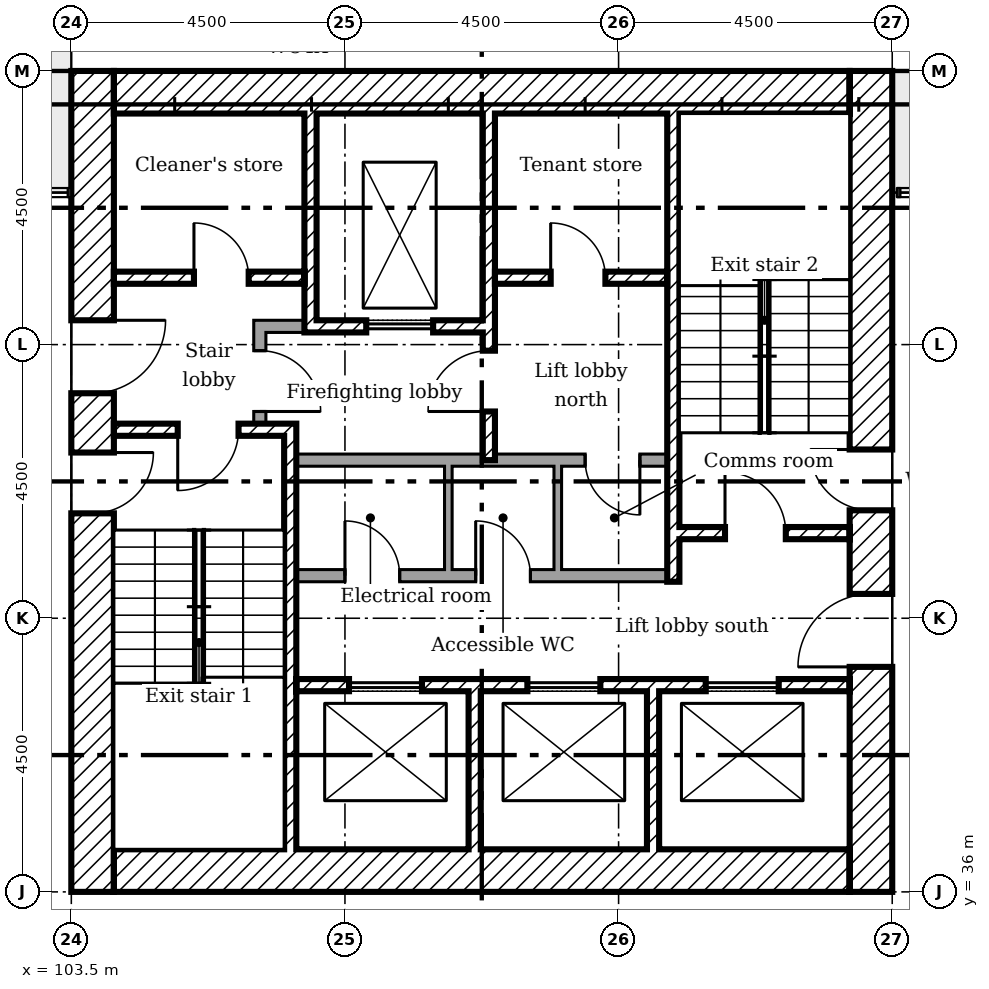
"""IFC4 building model, lengths in metres.
Left out: names, types, materials, properties, quantities, classifications, styles, units other than length and angle.
Written with IfcOpenShell. Run it as: python <this file> out.ifc"""

import sys

from ifc_helpers import new_model, si_unit, direction, frame, frame_2d, origin, place, context, subcontext, project, spatial, rectangle, extrude, element, fill, save


model = new_model("IFC4")
c1 = context("Model", 3, precision=1e-05, world=origin(), true_north=direction((0.0, 1.0)))
c2 = subcontext(c1, "Body", "Model", "MODEL_VIEW")
j1 = project(units=[si_unit("LENGTHUNIT", "METRE"), si_unit("PLANEANGLEUNIT", "RADIAN")], contexts=[c1])
p1 = place(None, origin())
s1 = spatial("IfcSite", under=j1, at=p1, CompositionType="ELEMENT")
p2 = place(p1, origin())
s2 = spatial("IfcBuilding", under=s1, at=p2, CompositionType="ELEMENT")
p3 = place(p2, frame((0.0, 0.0, 128.0)))
s3 = spatial("IfcBuildingStorey", under=s2, at=p3, CompositionType="ELEMENT", Elevation=128.0)
p4 = place(p3, frame((116.65, 36.0, 0.0), z_axis=(0.0, 0.0, 1.0), x_axis=(0.0, 1.0, 0.0)))
e1 = element("IfcWall", 1, at=p4, inside=s3, PredefinedType="SHEAR", context=c2, shape_type="SweptSolid", body=[
    extrude(rectangle(XDim=13.5, YDim=0.7, at=frame_2d((6.75, 0.0))), origin(), (0.0, 0.0, 1.0), 3.35),
])
p5 = place(p4, frame((3.7, 0.0, 0.0)))
e2 = element("IfcOpeningElement", 2, at=p5, cuts=e1, PredefinedType="OPENING", context=c2, shape_type="SweptSolid", body=[
    extrude(rectangle(XDim=1.2, YDim=2.1, at=frame_2d((0.6, 1.05))), frame((0.0, 0.36, 0.0), z_axis=(0.0, -1.0, 0.0), x_axis=(1.0, 0.0, 0.0)), (0.0, 0.0, 1.0), 0.72),
])
p6 = place(p4, frame((6.275, 0.0, 0.0)))
e3 = element("IfcOpeningElement", 3, at=p6, cuts=e1, PredefinedType="OPENING", context=c2, shape_type="SweptSolid", body=[
    extrude(rectangle(XDim=1.0, YDim=2.1, at=frame_2d((0.5, 1.05))), frame((0.0, 0.36, 0.0), z_axis=(0.0, -1.0, 0.0), x_axis=(1.0, 0.0, 0.0)), (0.0, 0.0, 1.0), 0.72),
])
for number, where in (
    (4, (104.2, 49.15, 0.0)),
    (5, (104.2, 36.35, 0.0)),
):
    element("IfcWall", number, at=place(p3, frame(where)), inside=s3, PredefinedType="SHEAR", context=c2, shape_type="SweptSolid", body=[
        extrude(rectangle(XDim=12.1, YDim=0.7, at=frame_2d((6.05, 0.0))), origin(), (0.0, 0.0, 1.0), 3.35),
    ])
p7 = place(p3, frame((103.85, 36.0, 0.0), z_axis=(0.0, 0.0, 1.0), x_axis=(0.0, 1.0, 0.0)))
e6 = element("IfcWall", 6, at=p7, inside=s3, PredefinedType="SHEAR", context=c2, shape_type="SweptSolid", body=[
    extrude(rectangle(XDim=13.5, YDim=0.7, at=frame_2d((6.75, 0.0))), origin(), (0.0, 0.0, 1.0), 3.35),
])
p8 = place(p7, frame((8.2, 0.0, 0.0)))
e7 = element("IfcOpeningElement", 7, at=p8, cuts=e6, PredefinedType="OPENING", context=c2, shape_type="SweptSolid", body=[
    extrude(rectangle(XDim=1.2, YDim=2.1, at=frame_2d((0.6, 1.05))), frame((0.0, 0.36, 0.0), z_axis=(0.0, -1.0, 0.0), x_axis=(1.0, 0.0, 0.0)), (0.0, 0.0, 1.0), 0.72),
])
p9 = place(p7, frame((6.225, 0.0, 0.0)))
e8 = element("IfcOpeningElement", 8, at=p9, cuts=e6, PredefinedType="OPENING", context=c2, shape_type="SweptSolid", body=[
    extrude(rectangle(XDim=1.0, YDim=2.1, at=frame_2d((0.5, 1.05))), frame((0.0, 0.36, 0.0), z_axis=(0.0, -1.0, 0.0), x_axis=(1.0, 0.0, 0.0)), (0.0, 0.0, 1.0), 0.72),
])
p10 = place(p3, frame((107.433, 48.8, 0.0), z_axis=(0.0, 0.0, 1.0), x_axis=(0.0, -1.0, 0.0)))
e9 = element("IfcWall", 9, at=p10, inside=s3, PredefinedType="SHEAR", context=c2, shape_type="SweptSolid", body=[
    extrude(rectangle(XDim=3.6, YDim=0.2, at=frame_2d((1.8, 0.0))), origin(), (0.0, 0.0, 1.0), 3.35),
])
p11 = place(p3, frame((110.367, 48.8, 0.0), z_axis=(0.0, 0.0, 1.0), x_axis=(0.0, -1.0, 0.0)))
e10 = element("IfcWall", 10, at=p11, inside=s3, PredefinedType="SHEAR", context=c2, shape_type="SweptSolid", body=[
    extrude(rectangle(XDim=5.7, YDim=0.2, at=frame_2d((2.85, 0.0))), origin(), (0.0, 0.0, 1.0), 3.35),
])
p12 = place(p11, frame((3.9, 0.0, 0.0)))
e11 = element("IfcOpeningElement", 11, at=p12, cuts=e10, PredefinedType="OPENING", context=c2, shape_type="SweptSolid", body=[
    extrude(rectangle(XDim=1.0, YDim=2.1, at=frame_2d((0.5, 1.05))), frame((0.0, 0.11, 0.0), z_axis=(0.0, -1.0, 0.0), x_axis=(1.0, 0.0, 0.0)), (0.0, 0.0, 1.0), 0.22),
])
for number, where, z_axis, x_axis in (
    (12, (110.133, 36.7, 0.0), (0.0, 0.0, 1.0), (0.0, 1.0, 0.0)),
    (13, (113.067, 36.7, 0.0), (0.0, 0.0, 1.0), (0.0, 1.0, 0.0)),
):
    element("IfcWall", number, at=place(p3, frame(where, z_axis=z_axis, x_axis=x_axis)), inside=s3, PredefinedType="SHEAR", context=c2, shape_type="SweptSolid", body=[
        extrude(rectangle(XDim=2.6, YDim=0.2, at=frame_2d((1.3, 0.0))), origin(), (0.0, 0.0, 1.0), 3.35),
    ])
p13 = place(p3, frame((106.5, 45.3, 0.0)))
e14 = element("IfcWall", 14, at=p13, inside=s3, PredefinedType="PARTITIONING", context=c2, shape_type="SweptSolid", body=[
    extrude(rectangle(XDim=0.833, YDim=0.2, at=frame_2d((0.417, 0.0))), origin(), (0.0, 0.0, 1.0), 3.35),
])
p14 = place(p3, frame((106.6, 43.7, 0.0), z_axis=(0.0, 0.0, 1.0), x_axis=(0.0, 1.0, 0.0)))
e15 = element("IfcWall", 15, at=p14, inside=s3, PredefinedType="PARTITIONING", context=c2, shape_type="SweptSolid", body=[
    extrude(rectangle(XDim=1.5, YDim=0.2, at=frame_2d((0.75, 0.0))), origin(), (0.0, 0.0, 1.0), 3.35),
])
p15 = place(p14, frame((0.2, 0.0, 0.0)))
e16 = element("IfcOpeningElement", 16, at=p15, cuts=e15, PredefinedType="OPENING", context=c2, shape_type="SweptSolid", body=[
    extrude(rectangle(XDim=1.0, YDim=2.1, at=frame_2d((0.5, 1.05))), frame((0.0, 0.11, 0.0), z_axis=(0.0, -1.0, 0.0), x_axis=(1.0, 0.0, 0.0)), (0.0, 0.0, 1.0), 0.22),
])
p16 = place(p3, frame((104.2, 46.1, 0.0)))
e17 = element("IfcWall", 17, at=p16, inside=s3, PredefinedType="SHEAR", context=c2, shape_type="SweptSolid", body=[
    extrude(rectangle(XDim=3.133, YDim=0.2, at=frame_2d((1.567, 0.0))), origin(), (0.0, 0.0, 1.0), 3.35),
])
p17 = place(p16, frame((1.317, 0.0, 0.0)))
e18 = element("IfcOpeningElement", 18, at=p17, cuts=e17, PredefinedType="OPENING", context=c2, shape_type="SweptSolid", body=[
    extrude(rectangle(XDim=0.9, YDim=2.1, at=frame_2d((0.45, 1.05))), frame((0.0, 0.11, 0.0), z_axis=(0.0, -1.0, 0.0), x_axis=(1.0, 0.0, 0.0)), (0.0, 0.0, 1.0), 0.22),
])
p18 = place(p3, frame((110.467, 46.1, 0.0)))
e19 = element("IfcWall", 19, at=p18, inside=s3, PredefinedType="SHEAR", context=c2, shape_type="SweptSolid", body=[
    extrude(rectangle(XDim=2.833, YDim=0.2, at=frame_2d((1.417, 0.0))), origin(), (0.0, 0.0, 1.0), 3.35),
])
p19 = place(p18, frame((0.917, 0.0, 0.0)))
e20 = element("IfcOpeningElement", 20, at=p19, cuts=e19, PredefinedType="OPENING", context=c2, shape_type="SweptSolid", body=[
    extrude(rectangle(XDim=0.9, YDim=2.1, at=frame_2d((0.45, 1.05))), frame((0.0, 0.11, 0.0), z_axis=(0.0, -1.0, 0.0), x_axis=(1.0, 0.0, 0.0)), (0.0, 0.0, 1.0), 0.22),
])
p20 = place(p3, frame((107.533, 45.3, 0.0)))
e21 = element("IfcWall", 21, at=p20, inside=s3, PredefinedType="SHEAR", context=c2, shape_type="SweptSolid", body=[
    extrude(rectangle(XDim=2.733, YDim=0.2, at=frame_2d((1.367, 0.0))), origin(), (0.0, 0.0, 1.0), 3.35),
])
p21 = place(p20, frame((0.817, 0.0, 0.0)))
e22 = element("IfcOpeningElement", 22, at=p21, cuts=e21, PredefinedType="OPENING", context=c2, shape_type="SweptSolid", body=[
    extrude(rectangle(XDim=1.1, YDim=2.1, at=frame_2d((0.55, 1.05))), frame((0.0, 0.11, 0.0), z_axis=(0.0, -1.0, 0.0), x_axis=(1.0, 0.0, 0.0)), (0.0, 0.0, 1.0), 0.22),
])
p22 = place(p3, frame((107.2, 39.4, 0.0)))
e23 = element("IfcWall", 23, at=p22, inside=s3, PredefinedType="SHEAR", context=c2, shape_type="SweptSolid", body=[
    extrude(rectangle(XDim=9.1, YDim=0.2, at=frame_2d((4.55, 0.0))), origin(), (0.0, 0.0, 1.0), 3.35),
])
p23 = place(p22, frame((0.867, 0.0, 0.0)))
e24 = element("IfcOpeningElement", 24, at=p23, cuts=e23, PredefinedType="OPENING", context=c2, shape_type="SweptSolid", body=[
    extrude(rectangle(XDim=1.2, YDim=2.1, at=frame_2d((0.6, 1.05))), frame((0.0, 0.11, 0.0), z_axis=(0.0, -1.0, 0.0), x_axis=(1.0, 0.0, 0.0)), (0.0, 0.0, 1.0), 0.22),
])
p24 = place(p22, frame((3.8, 0.0, 0.0)))
e25 = element("IfcOpeningElement", 25, at=p24, cuts=e23, PredefinedType="OPENING", context=c2, shape_type="SweptSolid", body=[
    extrude(rectangle(XDim=1.2, YDim=2.1, at=frame_2d((0.6, 1.05))), frame((0.0, 0.11, 0.0), z_axis=(0.0, -1.0, 0.0), x_axis=(1.0, 0.0, 0.0)), (0.0, 0.0, 1.0), 0.22),
])
p25 = place(p22, frame((6.733, 0.0, 0.0)))
e26 = element("IfcOpeningElement", 26, at=p25, cuts=e23, PredefinedType="OPENING", context=c2, shape_type="SweptSolid", body=[
    extrude(rectangle(XDim=1.2, YDim=2.1, at=frame_2d((0.6, 1.05))), frame((0.0, 0.11, 0.0), z_axis=(0.0, -1.0, 0.0), x_axis=(1.0, 0.0, 0.0)), (0.0, 0.0, 1.0), 0.22),
])
p26 = place(p3, frame((107.1, 36.7, 0.0), z_axis=(0.0, 0.0, 1.0), x_axis=(0.0, 1.0, 0.0)))
e27 = element("IfcWall", 27, at=p26, inside=s3, PredefinedType="SHEAR", context=c2, shape_type="SweptSolid", body=[
    extrude(rectangle(XDim=7.0, YDim=0.2, at=frame_2d((3.5, 0.0))), origin(), (0.0, 0.0, 1.0), 3.35),
])
p27 = place(p3, frame((104.2, 43.6, 0.0)))
e28 = element("IfcWall", 28, at=p27, inside=s3, PredefinedType="SHEAR", context=c2, shape_type="SweptSolid", body=[
    extrude(rectangle(XDim=2.8, YDim=0.2, at=frame_2d((1.4, 0.0))), origin(), (0.0, 0.0, 1.0), 3.35),
])
p28 = place(p27, frame((1.05, 0.0, 0.0)))
e29 = element("IfcOpeningElement", 29, at=p28, cuts=e28, PredefinedType="OPENING", context=c2, shape_type="SweptSolid", body=[
    extrude(rectangle(XDim=1.0, YDim=2.1, at=frame_2d((0.5, 1.05))), frame((0.0, 0.11, 0.0), z_axis=(0.0, -1.0, 0.0), x_axis=(1.0, 0.0, 0.0)), (0.0, 0.0, 1.0), 0.22),
])
p29 = place(p3, frame((113.5, 41.9, 0.0)))
e30 = element("IfcWall", 30, at=p29, inside=s3, PredefinedType="SHEAR", context=c2, shape_type="SweptSolid", body=[
    extrude(rectangle(XDim=2.8, YDim=0.2, at=frame_2d((1.4, 0.0))), origin(), (0.0, 0.0, 1.0), 3.35),
])
p30 = place(p29, frame((0.75, 0.0, 0.0)))
e31 = element("IfcOpeningElement", 31, at=p30, cuts=e30, PredefinedType="OPENING", context=c2, shape_type="SweptSolid", body=[
    extrude(rectangle(XDim=1.0, YDim=2.1, at=frame_2d((0.5, 1.05))), frame((0.0, 0.11, 0.0), z_axis=(0.0, -1.0, 0.0), x_axis=(1.0, 0.0, 0.0)), (0.0, 0.0, 1.0), 0.22),
])
p31 = place(p3, frame((113.4, 41.1, 0.0), z_axis=(0.0, 0.0, 1.0), x_axis=(0.0, 1.0, 0.0)))
e32 = element("IfcWall", 32, at=p31, inside=s3, PredefinedType="SHEAR", context=c2, shape_type="SweptSolid", body=[
    extrude(rectangle(XDim=7.7, YDim=0.2, at=frame_2d((3.85, 0.0))), origin(), (0.0, 0.0, 1.0), 3.35),
])
p32 = place(p3, frame((107.2, 43.1, 0.0)))
e33 = element("IfcWall", 33, at=p32, inside=s3, PredefinedType="PARTITIONING", context=c2, shape_type="SweptSolid", body=[
    extrude(rectangle(XDim=6.1, YDim=0.2, at=frame_2d((3.05, 0.0))), origin(), (0.0, 0.0, 1.0), 3.35),
])
p33 = place(p32, frame((4.75, 0.0, 0.0)))
e34 = element("IfcOpeningElement", 34, at=p33, cuts=e33, PredefinedType="OPENING", context=c2, shape_type="SweptSolid", body=[
    extrude(rectangle(XDim=0.9, YDim=2.1, at=frame_2d((0.45, 1.05))), frame((0.0, 0.11, 0.0), z_axis=(0.0, -1.0, 0.0), x_axis=(1.0, 0.0, 0.0)), (0.0, 0.0, 1.0), 0.22),
])
p34 = place(p3, frame((107.2, 41.2, 0.0)))
e35 = element("IfcWall", 35, at=p34, inside=s3, PredefinedType="PARTITIONING", context=c2, shape_type="SweptSolid", body=[
    extrude(rectangle(XDim=6.1, YDim=0.2, at=frame_2d((3.05, 0.0))), origin(), (0.0, 0.0, 1.0), 3.35),
])
p35 = place(p34, frame((0.8, 0.0, 0.0)))
e36 = element("IfcOpeningElement", 36, at=p35, cuts=e35, PredefinedType="OPENING", context=c2, shape_type="SweptSolid", body=[
    extrude(rectangle(XDim=0.9, YDim=2.1, at=frame_2d((0.45, 1.05))), frame((0.0, 0.11, 0.0), z_axis=(0.0, -1.0, 0.0), x_axis=(1.0, 0.0, 0.0)), (0.0, 0.0, 1.0), 0.22),
])
p36 = place(p34, frame((2.95, 0.0, 0.0)))
e37 = element("IfcOpeningElement", 37, at=p36, cuts=e35, PredefinedType="OPENING", context=c2, shape_type="SweptSolid", body=[
    extrude(rectangle(XDim=0.9, YDim=2.1, at=frame_2d((0.45, 1.05))), frame((0.0, 0.11, 0.0), z_axis=(0.0, -1.0, 0.0), x_axis=(1.0, 0.0, 0.0)), (0.0, 0.0, 1.0), 0.22),
])
for number, where, z_axis, x_axis in (
    (38, (109.7, 41.3, 0.0), (0.0, 0.0, 1.0), (0.0, 1.0, 0.0)),
    (39, (111.5, 41.3, 0.0), (0.0, 0.0, 1.0), (0.0, 1.0, 0.0)),
):
    element("IfcWall", number, at=place(p3, frame(where, z_axis=z_axis, x_axis=x_axis)), inside=s3, PredefinedType="PARTITIONING", context=c2, shape_type="SweptSolid", body=[
        extrude(rectangle(XDim=1.7, YDim=0.125, at=frame_2d((0.85, 0.0))), origin(), (0.0, 0.0, 1.0), 3.35),
    ])
p37 = place(p8, frame((1.2, 0.0, 0.0), x_axis=(-1.0, 0.0, 0.0)))
e40 = element("IfcDoor", 40, at=p37, inside=s3, OperationType="SINGLE_SWING_RIGHT", PredefinedType="DOOR", context=c2, shape_type="SweptSolid", body=[
    extrude(rectangle(XDim=1.2, YDim=2.1, at=frame_2d((0.6, 1.05))), frame((0.0, 0.025, 0.0), z_axis=(0.0, -1.0, 0.0), x_axis=(1.0, 0.0, 0.0)), (0.0, 0.0, 1.0), 0.05),
])
fill(e7, e40)
p38 = place(p5, origin())
e41 = element("IfcDoor", 41, at=p38, inside=s3, OperationType="SINGLE_SWING_RIGHT", PredefinedType="DOOR", context=c2, shape_type="SweptSolid", body=[
    extrude(rectangle(XDim=1.2, YDim=2.1, at=frame_2d((0.6, 1.05))), frame((0.0, 0.025, 0.0), z_axis=(0.0, -1.0, 0.0), x_axis=(1.0, 0.0, 0.0)), (0.0, 0.0, 1.0), 0.05),
])
fill(e2, e41)
p39 = place(p28, frame((1.0, 0.0, 0.0), x_axis=(-1.0, 0.0, 0.0)))
e42 = element("IfcDoor", 42, at=p39, inside=s3, OperationType="SINGLE_SWING_LEFT", PredefinedType="DOOR", context=c2, shape_type="SweptSolid", body=[
    extrude(rectangle(XDim=1.0, YDim=2.1, at=frame_2d((0.5, 1.05))), frame((0.0, 0.025, 0.0), z_axis=(0.0, -1.0, 0.0), x_axis=(1.0, 0.0, 0.0)), (0.0, 0.0, 1.0), 0.05),
])
fill(e29, e42)
p40 = place(p9, frame((1.0, 0.0, 0.0), x_axis=(-1.0, 0.0, 0.0)))
e43 = element("IfcDoor", 43, at=p40, inside=s3, OperationType="SINGLE_SWING_RIGHT", PredefinedType="DOOR", context=c2, shape_type="SweptSolid", body=[
    extrude(rectangle(XDim=1.0, YDim=2.1, at=frame_2d((0.5, 1.05))), frame((0.0, 0.025, 0.0), z_axis=(0.0, -1.0, 0.0), x_axis=(1.0, 0.0, 0.0)), (0.0, 0.0, 1.0), 0.05),
])
fill(e8, e43)
p41 = place(p30, origin())
e44 = element("IfcDoor", 44, at=p41, inside=s3, OperationType="SINGLE_SWING_RIGHT", PredefinedType="DOOR", context=c2, shape_type="SweptSolid", body=[
    extrude(rectangle(XDim=1.0, YDim=2.1, at=frame_2d((0.5, 1.05))), frame((0.0, 0.025, 0.0), z_axis=(0.0, -1.0, 0.0), x_axis=(1.0, 0.0, 0.0)), (0.0, 0.0, 1.0), 0.05),
])
fill(e31, e44)
p42 = place(p6, origin())
e45 = element("IfcDoor", 45, at=p42, inside=s3, OperationType="SINGLE_SWING_LEFT", PredefinedType="DOOR", context=c2, shape_type="SweptSolid", body=[
    extrude(rectangle(XDim=1.0, YDim=2.1, at=frame_2d((0.5, 1.05))), frame((0.0, 0.025, 0.0), z_axis=(0.0, -1.0, 0.0), x_axis=(1.0, 0.0, 0.0)), (0.0, 0.0, 1.0), 0.05),
])
fill(e3, e45)
p43 = place(p12, frame((1.0, 0.0, 0.0), x_axis=(-1.0, 0.0, 0.0)))
e46 = element("IfcDoor", 46, at=p43, inside=s3, OperationType="SINGLE_SWING_RIGHT", PredefinedType="DOOR", context=c2, shape_type="SweptSolid", body=[
    extrude(rectangle(XDim=1.0, YDim=2.1, at=frame_2d((0.5, 1.05))), frame((0.0, 0.025, 0.0), z_axis=(0.0, -1.0, 0.0), x_axis=(1.0, 0.0, 0.0)), (0.0, 0.0, 1.0), 0.05),
])
fill(e11, e46)
p44 = place(p15, frame((1.0, 0.0, 0.0), x_axis=(-1.0, 0.0, 0.0)))
e47 = element("IfcDoor", 47, at=p44, inside=s3, OperationType="SINGLE_SWING_LEFT", PredefinedType="DOOR", context=c2, shape_type="SweptSolid", body=[
    extrude(rectangle(XDim=1.0, YDim=2.1, at=frame_2d((0.5, 1.05))), frame((0.0, 0.025, 0.0), z_axis=(0.0, -1.0, 0.0), x_axis=(1.0, 0.0, 0.0)), (0.0, 0.0, 1.0), 0.05),
])
fill(e16, e47)
p45 = place(p17, origin())
e48 = element("IfcDoor", 48, at=p45, inside=s3, OperationType="SINGLE_SWING_RIGHT", PredefinedType="DOOR", context=c2, shape_type="SweptSolid", body=[
    extrude(rectangle(XDim=0.9, YDim=2.1, at=frame_2d((0.45, 1.05))), frame((0.0, 0.025, 0.0), z_axis=(0.0, -1.0, 0.0), x_axis=(1.0, 0.0, 0.0)), (0.0, 0.0, 1.0), 0.05),
])
fill(e18, e48)
p46 = place(p19, origin())
e49 = element("IfcDoor", 49, at=p46, inside=s3, OperationType="SINGLE_SWING_RIGHT", PredefinedType="DOOR", context=c2, shape_type="SweptSolid", body=[
    extrude(rectangle(XDim=0.9, YDim=2.1, at=frame_2d((0.45, 1.05))), frame((0.0, 0.025, 0.0), z_axis=(0.0, -1.0, 0.0), x_axis=(1.0, 0.0, 0.0)), (0.0, 0.0, 1.0), 0.05),
])
fill(e20, e49)
p47 = place(p35, origin())
e50 = element("IfcDoor", 50, at=p47, inside=s3, OperationType="SINGLE_SWING_RIGHT", PredefinedType="DOOR", context=c2, shape_type="SweptSolid", body=[
    extrude(rectangle(XDim=0.9, YDim=2.1, at=frame_2d((0.45, 1.05))), frame((0.0, 0.025, 0.0), z_axis=(0.0, -1.0, 0.0), x_axis=(1.0, 0.0, 0.0)), (0.0, 0.0, 1.0), 0.05),
])
fill(e36, e50)
p48 = place(p36, origin())
e51 = element("IfcDoor", 51, at=p48, inside=s3, OperationType="SINGLE_SWING_RIGHT", PredefinedType="DOOR", context=c2, shape_type="SweptSolid", body=[
    extrude(rectangle(XDim=0.9, YDim=2.1, at=frame_2d((0.45, 1.05))), frame((0.0, 0.025, 0.0), z_axis=(0.0, -1.0, 0.0), x_axis=(1.0, 0.0, 0.0)), (0.0, 0.0, 1.0), 0.05),
])
fill(e37, e51)
p49 = place(p33, frame((0.9, 0.0, 0.0), x_axis=(-1.0, 0.0, 0.0)))
e52 = element("IfcDoor", 52, at=p49, inside=s3, OperationType="SINGLE_SWING_RIGHT", PredefinedType="DOOR", context=c2, shape_type="SweptSolid", body=[
    extrude(rectangle(XDim=0.9, YDim=2.1, at=frame_2d((0.45, 1.05))), frame((0.0, 0.025, 0.0), z_axis=(0.0, -1.0, 0.0), x_axis=(1.0, 0.0, 0.0)), (0.0, 0.0, 1.0), 0.05),
])
fill(e34, e52)
p50 = place(p21, origin())
e53 = element("IfcDoor", 53, at=p50, inside=s3, OperationType="SLIDING_TO_LEFT", PredefinedType="DOOR", context=c2, shape_type="SweptSolid", body=[
    extrude(rectangle(XDim=1.1, YDim=2.1, at=frame_2d((0.55, 1.05))), frame((0.0, 0.025, 0.0), z_axis=(0.0, -1.0, 0.0), x_axis=(1.0, 0.0, 0.0)), (0.0, 0.0, 1.0), 0.05),
])
fill(e22, e53)
p51 = place(p23, origin())
e54 = element("IfcDoor", 54, at=p51, inside=s3, OperationType="SLIDING_TO_LEFT", PredefinedType="DOOR", context=c2, shape_type="SweptSolid", body=[
    extrude(rectangle(XDim=1.2, YDim=2.1, at=frame_2d((0.6, 1.05))), frame((0.0, 0.025, 0.0), z_axis=(0.0, -1.0, 0.0), x_axis=(1.0, 0.0, 0.0)), (0.0, 0.0, 1.0), 0.05),
])
fill(e24, e54)
p52 = place(p24, origin())
e55 = element("IfcDoor", 55, at=p52, inside=s3, OperationType="SLIDING_TO_LEFT", PredefinedType="DOOR", context=c2, shape_type="SweptSolid", body=[
    extrude(rectangle(XDim=1.2, YDim=2.1, at=frame_2d((0.6, 1.05))), frame((0.0, 0.025, 0.0), z_axis=(0.0, -1.0, 0.0), x_axis=(1.0, 0.0, 0.0)), (0.0, 0.0, 1.0), 0.05),
])
fill(e25, e55)
p53 = place(p25, origin())
e56 = element("IfcDoor", 56, at=p53, inside=s3, OperationType="SLIDING_TO_LEFT", PredefinedType="DOOR", context=c2, shape_type="SweptSolid", body=[
    extrude(rectangle(XDim=1.2, YDim=2.1, at=frame_2d((0.6, 1.05))), frame((0.0, 0.025, 0.0), z_axis=(0.0, -1.0, 0.0), x_axis=(1.0, 0.0, 0.0)), (0.0, 0.0, 1.0), 0.05),
])
fill(e26, e56)
save(model, sys.argv[1])
